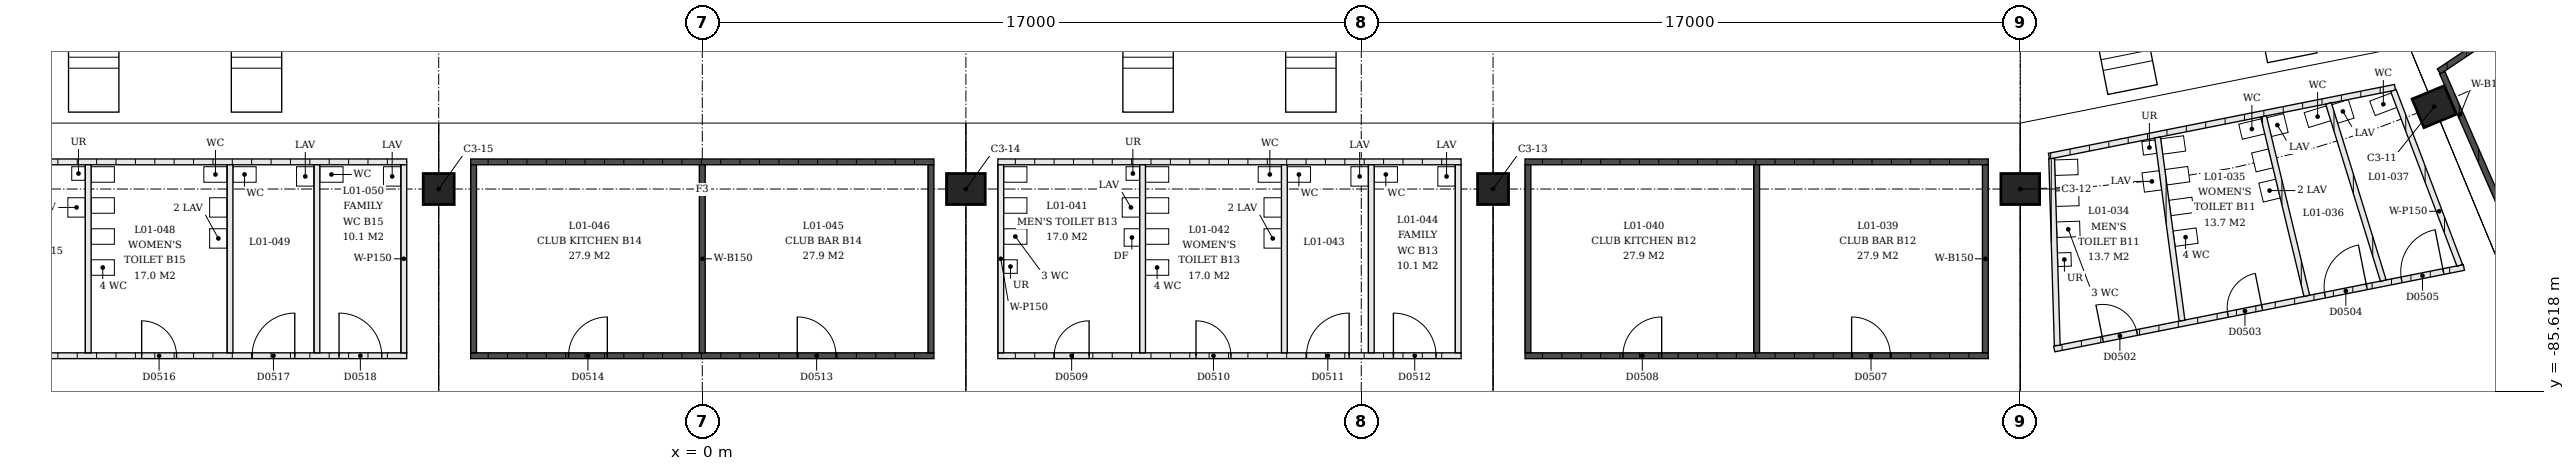
"""IFC4 building model, lengths in metres.
Left out: names, types, materials, properties, quantities, classifications, styles, units other than length and angle.
Written with IfcOpenShell. Run it as: python <this file> out.ifc"""

import sys

from ifc_helpers import new_model, si_unit, direction, frame, frame_2d, origin, origin_2d, place, context, subcontext, project, spatial, rectangle, extrude, element, fill, save


model = new_model("IFC4")
c1 = context("Model", 3, precision=1e-05, world=origin(), true_north=direction((0.0, 1.0)))
c2 = subcontext(c1, "Body", "Model", "MODEL_VIEW")
j1 = project(units=[si_unit("LENGTHUNIT", "METRE"), si_unit("PLANEANGLEUNIT", "RADIAN")], contexts=[c1])
p1 = place(None, origin())
s1 = spatial("IfcSite", under=j1, at=p1, CompositionType="ELEMENT")
p2 = place(p1, origin())
s2 = spatial("IfcBuilding", under=s1, at=p2, CompositionType="ELEMENT")
p3 = place(p2, frame((0.0, 0.0, 4.5)))
s3 = spatial("IfcBuildingStorey", under=s2, at=p3, CompositionType="ELEMENT", Elevation=4.5)
p4 = place(p3, frame((44.677, -78.276, 0.0), z_axis=(0.0, 0.0, 1.0), x_axis=(0.923879532511, 0.382683432365, 0.0)))
e1 = element("IfcColumn", 1, at=p4, inside=s3, PredefinedType="COLUMN", context=c2, shape_type="SweptSolid", body=[
    extrude(rectangle(XDim=0.9, YDim=0.8, at=origin_2d()), origin(), (0.0, 0.0, 1.0), 4.5),
])
p5 = place(p3, frame((34.0, -80.4, 0.0), z_axis=(0.0, 0.0, 1.0), x_axis=(1.0, 0.0, 0.0)))
e2 = element("IfcColumn", 2, at=p5, inside=s3, PredefinedType="COLUMN", context=c2, shape_type="SweptSolid", body=[
    extrude(rectangle(XDim=1.0, YDim=0.8, at=origin_2d()), origin(), (0.0, 0.0, 1.0), 4.5),
])
p6 = place(p3, frame((20.4, -80.4, 0.0), z_axis=(0.0, 0.0, 1.0), x_axis=(1.0, 0.0, 0.0)))
e3 = element("IfcColumn", 3, at=p6, inside=s3, PredefinedType="COLUMN", context=c2, shape_type="SweptSolid", body=[
    extrude(rectangle(XDim=0.8, YDim=0.8, at=origin_2d()), origin(), (0.0, 0.0, 1.0), 4.5),
])
p7 = place(p3, frame((6.8, -80.4, 0.0), z_axis=(0.0, 0.0, 1.0), x_axis=(1.0, 0.0, 0.0)))
e4 = element("IfcColumn", 4, at=p7, inside=s3, PredefinedType="COLUMN", context=c2, shape_type="SweptSolid", body=[
    extrude(rectangle(XDim=1.0, YDim=0.8, at=origin_2d()), origin(), (0.0, 0.0, 1.0), 4.5),
])
p8 = place(p3, frame((-6.8, -80.4, 0.0), z_axis=(0.0, 0.0, 1.0), x_axis=(1.0, 0.0, 0.0)))
e5 = element("IfcColumn", 5, at=p8, inside=s3, PredefinedType="COLUMN", context=c2, shape_type="SweptSolid", body=[
    extrude(rectangle(XDim=0.8, YDim=0.8, at=origin_2d()), origin(), (0.0, 0.0, 1.0), 4.5),
])
p9 = place(p3, frame((52.605, -72.153, 0.0), z_axis=(0.0, 0.0, 1.0), x_axis=(-0.831461674059, -0.555582113257, 0.0)))
e6 = element("IfcWall", 6, at=p9, inside=s3, PredefinedType="SOLIDWALL", context=c2, shape_type="SweptSolid", body=[
    extrude(rectangle(XDim=9.388, YDim=0.15, at=frame_2d((4.694, 0.0))), origin(), (0.0, 0.0, 1.0), 3.0),
])
p10 = place(p3, frame((44.886, -77.399, 0.0), z_axis=(0.0, 0.0, 1.0), x_axis=(0.400646552146, -0.916232688924, 0.0)))
e7 = element("IfcWall", 7, at=p10, inside=s3, PredefinedType="SOLIDWALL", context=c2, shape_type="SweptSolid", body=[
    extrude(rectangle(XDim=4.832, YDim=0.15, at=frame_2d((2.416, 0.0))), origin(), (0.0, 0.0, 1.0), 3.0),
])
p11 = place(p3, frame((34.741, -79.552, 0.0), z_axis=(0.0, 0.0, 1.0), x_axis=(0.980786464492, 0.195084369103, 0.0)))
e8 = element("IfcWall", 8, at=p11, inside=s3, PredefinedType="PARTITIONING", context=c2, shape_type="SweptSolid", body=[
    extrude(rectangle(XDim=9.102, YDim=0.15, at=frame_2d((4.551, 0.0))), origin(), (0.0, 0.0, 1.0), 3.0),
])
p12 = place(p3, frame((34.877, -84.525, 0.0), z_axis=(0.0, 0.0, 1.0), x_axis=(0.98078580384, 0.195087690502, 0.0)))
e9 = element("IfcWall", 9, at=p12, inside=s3, PredefinedType="PARTITIONING", context=c2, shape_type="SweptSolid", body=[
    extrude(rectangle(XDim=10.775, YDim=0.15, at=frame_2d((5.387, 0.0))), origin(), (0.0, 0.0, 1.0), 3.0),
])
p13 = place(p12, frame((1.276, 0.0, 0.0)))
e10 = element("IfcOpeningElement", 10, at=p13, cuts=e9, PredefinedType="OPENING", context=c2, shape_type="SweptSolid", body=[
    extrude(rectangle(XDim=0.9, YDim=2.1, at=frame_2d((0.45, 1.05))), frame((0.0, 0.075, 0.0), z_axis=(0.0, -1.0, 0.0), x_axis=(1.0, 0.0, 0.0)), (0.0, 0.0, 1.0), 0.15),
])
p14 = place(p12, frame((4.566, 0.0, 0.0)))
e11 = element("IfcOpeningElement", 11, at=p14, cuts=e9, PredefinedType="OPENING", context=c2, shape_type="SweptSolid", body=[
    extrude(rectangle(XDim=0.9, YDim=2.1, at=frame_2d((0.45, 1.05))), frame((0.0, 0.075, 0.0), z_axis=(0.0, -1.0, 0.0), x_axis=(1.0, 0.0, 0.0)), (0.0, 0.0, 1.0), 0.15),
])
p15 = place(p12, frame((7.119, 0.0, 0.0)))
e12 = element("IfcOpeningElement", 12, at=p15, cuts=e9, PredefinedType="OPENING", context=c2, shape_type="SweptSolid", body=[
    extrude(rectangle(XDim=1.1, YDim=2.1, at=frame_2d((0.55, 1.05))), frame((0.0, 0.075, 0.0), z_axis=(0.0, -1.0, 0.0), x_axis=(1.0, 0.0, 0.0)), (0.0, 0.0, 1.0), 0.15),
])
p16 = place(p12, frame((9.135, 0.0, 0.0)))
e13 = element("IfcOpeningElement", 13, at=p16, cuts=e9, PredefinedType="OPENING", context=c2, shape_type="SweptSolid", body=[
    extrude(rectangle(XDim=1.1, YDim=2.1, at=frame_2d((0.55, 1.05))), frame((0.0, 0.075, 0.0), z_axis=(0.0, -1.0, 0.0), x_axis=(1.0, 0.0, 0.0)), (0.0, 0.0, 1.0), 0.15),
])
p17 = place(p3, frame((34.811, -79.614, 0.0), z_axis=(0.0, 0.0, 1.0), x_axis=(0.02991368842, -0.999552485488, 0.0)))
e14 = element("IfcWall", 14, at=p17, inside=s3, PredefinedType="PARTITIONING", context=c2, shape_type="SweptSolid", body=[
    extrude(rectangle(XDim=4.823, YDim=0.15, at=frame_2d((2.412, 0.0))), origin(), (0.0, 0.0, 1.0), 3.0),
])
p18 = place(p3, frame((37.544, -79.07, 0.0), z_axis=(0.0, 0.0, 1.0), x_axis=(0.132200625744, -0.99122297923, 0.0)))
e15 = element("IfcWall", 15, at=p18, inside=s3, PredefinedType="PARTITIONING", context=c2, shape_type="SweptSolid", body=[
    extrude(rectangle(XDim=4.766, YDim=0.15, at=frame_2d((2.383, 0.0))), origin(), (0.0, 0.0, 1.0), 3.0),
])
p19 = place(p3, frame((40.277, -78.526, 0.0), z_axis=(0.0, 0.0, 1.0), x_axis=(0.234455054274, -0.9721269606, 0.0)))
e16 = element("IfcWall", 16, at=p19, inside=s3, PredefinedType="PARTITIONING", context=c2, shape_type="SweptSolid", body=[
    extrude(rectangle(XDim=4.761, YDim=0.15, at=frame_2d((2.38, 0.0))), origin(), (0.0, 0.0, 1.0), 3.0),
])
p20 = place(p3, frame((41.952, -78.193, 0.0), z_axis=(0.0, 0.0, 1.0), x_axis=(0.295678182088, -0.955287607288, 0.0)))
e17 = element("IfcWall", 17, at=p20, inside=s3, PredefinedType="PARTITIONING", context=c2, shape_type="SweptSolid", body=[
    extrude(rectangle(XDim=4.782, YDim=0.15, at=frame_2d((2.391, 0.0))), origin(), (0.0, 0.0, 1.0), 3.0),
])
p21 = place(p3, frame((43.627, -77.86, 0.0), z_axis=(0.0, 0.0, 1.0), x_axis=(0.354909029819, -0.934900839957, 0.0)))
e18 = element("IfcWall", 18, at=p21, inside=s3, PredefinedType="PARTITIONING", context=c2, shape_type="SweptSolid", body=[
    extrude(rectangle(XDim=4.823, YDim=0.15, at=frame_2d((2.412, 0.0))), origin(), (0.0, 0.0, 1.0), 3.0),
])
p22 = place(p3, frame((33.175, -79.7, 0.0), z_axis=(0.0, 0.0, 1.0), x_axis=(-1.0, 0.0, 0.0)))
e19 = element("IfcWall", 19, at=p22, inside=s3, PredefinedType="SOLIDWALL", context=c2, shape_type="SweptSolid", body=[
    extrude(rectangle(XDim=11.95, YDim=0.15, at=frame_2d((5.975, 0.0))), origin(), (0.0, 0.0, 1.0), 3.0),
])
p23 = place(p3, frame((33.175, -84.7, 0.0), z_axis=(0.0, 0.0, 1.0), x_axis=(-1.0, 0.0, 0.0)))
e20 = element("IfcWall", 20, at=p23, inside=s3, PredefinedType="SOLIDWALL", context=c2, shape_type="SweptSolid", body=[
    extrude(rectangle(XDim=11.95, YDim=0.15, at=frame_2d((5.975, 0.0))), origin(), (0.0, 0.0, 1.0), 3.0),
])
p24 = place(p23, frame((2.525, 0.0, 0.0)))
e21 = element("IfcOpeningElement", 21, at=p24, cuts=e20, PredefinedType="OPENING", context=c2, shape_type="SweptSolid", body=[
    extrude(rectangle(XDim=1.0, YDim=2.1, at=frame_2d((0.5, 1.05))), frame((0.0, 0.075, 0.0), z_axis=(0.0, -1.0, 0.0), x_axis=(1.0, 0.0, 0.0)), (0.0, 0.0, 1.0), 0.15),
])
p25 = place(p23, frame((8.425, 0.0, 0.0)))
e22 = element("IfcOpeningElement", 22, at=p25, cuts=e20, PredefinedType="OPENING", context=c2, shape_type="SweptSolid", body=[
    extrude(rectangle(XDim=1.0, YDim=2.1, at=frame_2d((0.5, 1.05))), frame((0.0, 0.075, 0.0), z_axis=(0.0, -1.0, 0.0), x_axis=(1.0, 0.0, 0.0)), (0.0, 0.0, 1.0), 0.15),
])
for number, where, z_axis, x_axis in (
    (23, (33.1, -79.775, 0.0), (0.0, 0.0, 1.0), (0.0, -1.0, 0.0)),
    (24, (27.2, -79.775, 0.0), (0.0, 0.0, 1.0), (0.0, -1.0, 0.0)),
    (25, (21.3, -79.775, 0.0), (0.0, 0.0, 1.0), (0.0, -1.0, 0.0)),
):
    element("IfcWall", number, at=place(p3, frame(where, z_axis=z_axis, x_axis=x_axis)), inside=s3, PredefinedType="SOLIDWALL", context=c2, shape_type="SweptSolid", body=[
        extrude(rectangle(XDim=4.85, YDim=0.15, at=frame_2d((2.425, 0.0))), origin(), (0.0, 0.0, 1.0), 3.0),
    ])
p26 = place(p3, frame((7.625, -79.7, 0.0), z_axis=(0.0, 0.0, 1.0), x_axis=(1.0, 0.0, 0.0)))
e26 = element("IfcWall", 26, at=p26, inside=s3, PredefinedType="PARTITIONING", context=c2, shape_type="SweptSolid", body=[
    extrude(rectangle(XDim=11.95, YDim=0.15, at=frame_2d((5.975, 0.0))), origin(), (0.0, 0.0, 1.0), 3.0),
])
p27 = place(p3, frame((7.625, -84.7, 0.0), z_axis=(0.0, 0.0, 1.0), x_axis=(1.0, 0.0, 0.0)))
e27 = element("IfcWall", 27, at=p27, inside=s3, PredefinedType="PARTITIONING", context=c2, shape_type="SweptSolid", body=[
    extrude(rectangle(XDim=11.95, YDim=0.15, at=frame_2d((5.975, 0.0))), origin(), (0.0, 0.0, 1.0), 3.0),
])
p28 = place(p27, frame((1.454, 0.0, 0.0)))
e28 = element("IfcOpeningElement", 28, at=p28, cuts=e27, PredefinedType="OPENING", context=c2, shape_type="SweptSolid", body=[
    extrude(rectangle(XDim=0.9, YDim=2.1, at=frame_2d((0.45, 1.05))), frame((0.0, 0.075, 0.0), z_axis=(0.0, -1.0, 0.0), x_axis=(1.0, 0.0, 0.0)), (0.0, 0.0, 1.0), 0.15),
])
p29 = place(p27, frame((5.112, 0.0, 0.0)))
e29 = element("IfcOpeningElement", 29, at=p29, cuts=e27, PredefinedType="OPENING", context=c2, shape_type="SweptSolid", body=[
    extrude(rectangle(XDim=0.9, YDim=2.1, at=frame_2d((0.45, 1.05))), frame((0.0, 0.075, 0.0), z_axis=(0.0, -1.0, 0.0), x_axis=(1.0, 0.0, 0.0)), (0.0, 0.0, 1.0), 0.15),
])
p30 = place(p27, frame((7.962, 0.0, 0.0)))
e30 = element("IfcOpeningElement", 30, at=p30, cuts=e27, PredefinedType="OPENING", context=c2, shape_type="SweptSolid", body=[
    extrude(rectangle(XDim=1.1, YDim=2.1, at=frame_2d((0.55, 1.05))), frame((0.0, 0.075, 0.0), z_axis=(0.0, -1.0, 0.0), x_axis=(1.0, 0.0, 0.0)), (0.0, 0.0, 1.0), 0.15),
])
p31 = place(p27, frame((10.204, 0.0, 0.0)))
e31 = element("IfcOpeningElement", 31, at=p31, cuts=e27, PredefinedType="OPENING", context=c2, shape_type="SweptSolid", body=[
    extrude(rectangle(XDim=1.1, YDim=2.1, at=frame_2d((0.55, 1.05))), frame((0.0, 0.075, 0.0), z_axis=(0.0, -1.0, 0.0), x_axis=(1.0, 0.0, 0.0)), (0.0, 0.0, 1.0), 0.15),
])
for number, where, z_axis, x_axis in (
    (32, (7.7, -79.775, 0.0), (0.0, 0.0, 1.0), (0.0, -1.0, 0.0)),
    (33, (11.358, -79.775, 0.0), (0.0, 0.0, 1.0), (0.0, -1.0, 0.0)),
    (34, (15.016, -79.775, 0.0), (0.0, 0.0, 1.0), (0.0, -1.0, 0.0)),
    (35, (17.258, -79.775, 0.0), (0.0, 0.0, 1.0), (0.0, -1.0, 0.0)),
    (36, (19.5, -79.775, 0.0), (0.0, 0.0, 1.0), (0.0, -1.0, 0.0)),
):
    element("IfcWall", number, at=place(p3, frame(where, z_axis=z_axis, x_axis=x_axis)), inside=s3, PredefinedType="PARTITIONING", context=c2, shape_type="SweptSolid", body=[
        extrude(rectangle(XDim=4.85, YDim=0.15, at=frame_2d((2.425, 0.0))), origin(), (0.0, 0.0, 1.0), 3.0),
    ])
p32 = place(p3, frame((5.975, -79.7, 0.0), z_axis=(0.0, 0.0, 1.0), x_axis=(-1.0, 0.0, 0.0)))
e37 = element("IfcWall", 37, at=p32, inside=s3, PredefinedType="SOLIDWALL", context=c2, shape_type="SweptSolid", body=[
    extrude(rectangle(XDim=11.95, YDim=0.15, at=frame_2d((5.975, 0.0))), origin(), (0.0, 0.0, 1.0), 3.0),
])
p33 = place(p3, frame((5.975, -84.7, 0.0), z_axis=(0.0, 0.0, 1.0), x_axis=(-1.0, 0.0, 0.0)))
e38 = element("IfcWall", 38, at=p33, inside=s3, PredefinedType="SOLIDWALL", context=c2, shape_type="SweptSolid", body=[
    extrude(rectangle(XDim=11.95, YDim=0.15, at=frame_2d((5.975, 0.0))), origin(), (0.0, 0.0, 1.0), 3.0),
])
p34 = place(p33, frame((2.525, 0.0, 0.0)))
e39 = element("IfcOpeningElement", 39, at=p34, cuts=e38, PredefinedType="OPENING", context=c2, shape_type="SweptSolid", body=[
    extrude(rectangle(XDim=1.0, YDim=2.1, at=frame_2d((0.5, 1.05))), frame((0.0, 0.075, 0.0), z_axis=(0.0, -1.0, 0.0), x_axis=(1.0, 0.0, 0.0)), (0.0, 0.0, 1.0), 0.15),
])
p35 = place(p33, frame((8.425, 0.0, 0.0)))
e40 = element("IfcOpeningElement", 40, at=p35, cuts=e38, PredefinedType="OPENING", context=c2, shape_type="SweptSolid", body=[
    extrude(rectangle(XDim=1.0, YDim=2.1, at=frame_2d((0.5, 1.05))), frame((0.0, 0.075, 0.0), z_axis=(0.0, -1.0, 0.0), x_axis=(1.0, 0.0, 0.0)), (0.0, 0.0, 1.0), 0.15),
])
for number, where, z_axis, x_axis in (
    (41, (5.9, -79.775, 0.0), (0.0, 0.0, 1.0), (0.0, -1.0, 0.0)),
    (42, (0.0, -79.775, 0.0), (0.0, 0.0, 1.0), (0.0, -1.0, 0.0)),
    (43, (-5.9, -79.775, 0.0), (0.0, 0.0, 1.0), (0.0, -1.0, 0.0)),
):
    element("IfcWall", number, at=place(p3, frame(where, z_axis=z_axis, x_axis=x_axis)), inside=s3, PredefinedType="SOLIDWALL", context=c2, shape_type="SweptSolid", body=[
        extrude(rectangle(XDim=4.85, YDim=0.15, at=frame_2d((2.425, 0.0))), origin(), (0.0, 0.0, 1.0), 3.0),
    ])
p36 = place(p3, frame((-19.575, -79.7, 0.0), z_axis=(0.0, 0.0, 1.0), x_axis=(1.0, 0.0, 0.0)))
e44 = element("IfcWall", 44, at=p36, inside=s3, PredefinedType="PARTITIONING", context=c2, shape_type="SweptSolid", body=[
    extrude(rectangle(XDim=11.95, YDim=0.15, at=frame_2d((5.975, 0.0))), origin(), (0.0, 0.0, 1.0), 3.0),
])
p37 = place(p3, frame((-19.575, -84.7, 0.0), z_axis=(0.0, 0.0, 1.0), x_axis=(1.0, 0.0, 0.0)))
e45 = element("IfcWall", 45, at=p37, inside=s3, PredefinedType="PARTITIONING", context=c2, shape_type="SweptSolid", body=[
    extrude(rectangle(XDim=11.95, YDim=0.15, at=frame_2d((5.975, 0.0))), origin(), (0.0, 0.0, 1.0), 3.0),
])
p38 = place(p37, frame((1.454, 0.0, 0.0)))
e46 = element("IfcOpeningElement", 46, at=p38, cuts=e45, PredefinedType="OPENING", context=c2, shape_type="SweptSolid", body=[
    extrude(rectangle(XDim=0.9, YDim=2.1, at=frame_2d((0.45, 1.05))), frame((0.0, 0.075, 0.0), z_axis=(0.0, -1.0, 0.0), x_axis=(1.0, 0.0, 0.0)), (0.0, 0.0, 1.0), 0.15),
])
p39 = place(p37, frame((5.112, 0.0, 0.0)))
e47 = element("IfcOpeningElement", 47, at=p39, cuts=e45, PredefinedType="OPENING", context=c2, shape_type="SweptSolid", body=[
    extrude(rectangle(XDim=0.9, YDim=2.1, at=frame_2d((0.45, 1.05))), frame((0.0, 0.075, 0.0), z_axis=(0.0, -1.0, 0.0), x_axis=(1.0, 0.0, 0.0)), (0.0, 0.0, 1.0), 0.15),
])
p40 = place(p37, frame((7.962, 0.0, 0.0)))
e48 = element("IfcOpeningElement", 48, at=p40, cuts=e45, PredefinedType="OPENING", context=c2, shape_type="SweptSolid", body=[
    extrude(rectangle(XDim=1.1, YDim=2.1, at=frame_2d((0.55, 1.05))), frame((0.0, 0.075, 0.0), z_axis=(0.0, -1.0, 0.0), x_axis=(1.0, 0.0, 0.0)), (0.0, 0.0, 1.0), 0.15),
])
p41 = place(p37, frame((10.204, 0.0, 0.0)))
e49 = element("IfcOpeningElement", 49, at=p41, cuts=e45, PredefinedType="OPENING", context=c2, shape_type="SweptSolid", body=[
    extrude(rectangle(XDim=1.1, YDim=2.1, at=frame_2d((0.55, 1.05))), frame((0.0, 0.075, 0.0), z_axis=(0.0, -1.0, 0.0), x_axis=(1.0, 0.0, 0.0)), (0.0, 0.0, 1.0), 0.15),
])
for number, where, z_axis, x_axis in (
    (50, (-15.842, -79.775, 0.0), (0.0, 0.0, 1.0), (0.0, -1.0, 0.0)),
    (51, (-12.184, -79.775, 0.0), (0.0, 0.0, 1.0), (0.0, -1.0, 0.0)),
    (52, (-9.942, -79.775, 0.0), (0.0, 0.0, 1.0), (0.0, -1.0, 0.0)),
    (53, (-7.7, -79.775, 0.0), (0.0, 0.0, 1.0), (0.0, -1.0, 0.0)),
):
    element("IfcWall", number, at=place(p3, frame(where, z_axis=z_axis, x_axis=x_axis)), inside=s3, PredefinedType="PARTITIONING", context=c2, shape_type="SweptSolid", body=[
        extrude(rectangle(XDim=4.85, YDim=0.15, at=frame_2d((2.425, 0.0))), origin(), (0.0, 0.0, 1.0), 3.0),
    ])
p42 = place(p13, origin())
e54 = element("IfcDoor", 54, at=p42, inside=s3, OperationType="SINGLE_SWING_RIGHT", PredefinedType="DOOR", context=c2, shape_type="SweptSolid", body=[
    extrude(rectangle(XDim=0.9, YDim=2.1, at=frame_2d((0.45, 1.05))), frame((0.0, 0.025, 0.0), z_axis=(0.0, -1.0, 0.0), x_axis=(1.0, 0.0, 0.0)), (0.0, 0.0, 1.0), 0.05),
])
fill(e10, e54)
p43 = place(p14, origin())
e55 = element("IfcDoor", 55, at=p43, inside=s3, OperationType="SINGLE_SWING_LEFT", PredefinedType="DOOR", context=c2, shape_type="SweptSolid", body=[
    extrude(rectangle(XDim=0.9, YDim=2.1, at=frame_2d((0.45, 1.05))), frame((0.0, 0.025, 0.0), z_axis=(0.0, -1.0, 0.0), x_axis=(1.0, 0.0, 0.0)), (0.0, 0.0, 1.0), 0.05),
])
fill(e11, e55)
p44 = place(p15, origin())
e56 = element("IfcDoor", 56, at=p44, inside=s3, OperationType="SINGLE_SWING_LEFT", PredefinedType="DOOR", context=c2, shape_type="SweptSolid", body=[
    extrude(rectangle(XDim=1.1, YDim=2.1, at=frame_2d((0.55, 1.05))), frame((0.0, 0.025, 0.0), z_axis=(0.0, -1.0, 0.0), x_axis=(1.0, 0.0, 0.0)), (0.0, 0.0, 1.0), 0.05),
])
fill(e12, e56)
p45 = place(p16, origin())
e57 = element("IfcDoor", 57, at=p45, inside=s3, OperationType="SINGLE_SWING_LEFT", PredefinedType="DOOR", context=c2, shape_type="SweptSolid", body=[
    extrude(rectangle(XDim=1.1, YDim=2.1, at=frame_2d((0.55, 1.05))), frame((0.0, 0.025, 0.0), z_axis=(0.0, -1.0, 0.0), x_axis=(1.0, 0.0, 0.0)), (0.0, 0.0, 1.0), 0.05),
])
fill(e13, e57)
p46 = place(p24, origin())
e58 = element("IfcDoor", 58, at=p46, inside=s3, OperationType="SINGLE_SWING_RIGHT", PredefinedType="DOOR", context=c2, shape_type="SweptSolid", body=[
    extrude(rectangle(XDim=1.0, YDim=2.1, at=frame_2d((0.5, 1.05))), frame((0.0, 0.025, 0.0), z_axis=(0.0, -1.0, 0.0), x_axis=(1.0, 0.0, 0.0)), (0.0, 0.0, 1.0), 0.05),
])
fill(e21, e58)
p47 = place(p25, origin())
e59 = element("IfcDoor", 59, at=p47, inside=s3, OperationType="SINGLE_SWING_LEFT", PredefinedType="DOOR", context=c2, shape_type="SweptSolid", body=[
    extrude(rectangle(XDim=1.0, YDim=2.1, at=frame_2d((0.5, 1.05))), frame((0.0, 0.025, 0.0), z_axis=(0.0, -1.0, 0.0), x_axis=(1.0, 0.0, 0.0)), (0.0, 0.0, 1.0), 0.05),
])
fill(e22, e59)
p48 = place(p28, origin())
e60 = element("IfcDoor", 60, at=p48, inside=s3, OperationType="SINGLE_SWING_LEFT", PredefinedType="DOOR", context=c2, shape_type="SweptSolid", body=[
    extrude(rectangle(XDim=0.9, YDim=2.1, at=frame_2d((0.45, 1.05))), frame((0.0, 0.025, 0.0), z_axis=(0.0, -1.0, 0.0), x_axis=(1.0, 0.0, 0.0)), (0.0, 0.0, 1.0), 0.05),
])
fill(e28, e60)
p49 = place(p29, origin())
e61 = element("IfcDoor", 61, at=p49, inside=s3, OperationType="SINGLE_SWING_RIGHT", PredefinedType="DOOR", context=c2, shape_type="SweptSolid", body=[
    extrude(rectangle(XDim=0.9, YDim=2.1, at=frame_2d((0.45, 1.05))), frame((0.0, 0.025, 0.0), z_axis=(0.0, -1.0, 0.0), x_axis=(1.0, 0.0, 0.0)), (0.0, 0.0, 1.0), 0.05),
])
fill(e29, e61)
p50 = place(p30, origin())
e62 = element("IfcDoor", 62, at=p50, inside=s3, OperationType="SINGLE_SWING_LEFT", PredefinedType="DOOR", context=c2, shape_type="SweptSolid", body=[
    extrude(rectangle(XDim=1.1, YDim=2.1, at=frame_2d((0.55, 1.05))), frame((0.0, 0.025, 0.0), z_axis=(0.0, -1.0, 0.0), x_axis=(1.0, 0.0, 0.0)), (0.0, 0.0, 1.0), 0.05),
])
fill(e30, e62)
p51 = place(p31, origin())
e63 = element("IfcDoor", 63, at=p51, inside=s3, OperationType="SINGLE_SWING_RIGHT", PredefinedType="DOOR", context=c2, shape_type="SweptSolid", body=[
    extrude(rectangle(XDim=1.1, YDim=2.1, at=frame_2d((0.55, 1.05))), frame((0.0, 0.025, 0.0), z_axis=(0.0, -1.0, 0.0), x_axis=(1.0, 0.0, 0.0)), (0.0, 0.0, 1.0), 0.05),
])
fill(e31, e63)
p52 = place(p34, origin())
e64 = element("IfcDoor", 64, at=p52, inside=s3, OperationType="SINGLE_SWING_RIGHT", PredefinedType="DOOR", context=c2, shape_type="SweptSolid", body=[
    extrude(rectangle(XDim=1.0, YDim=2.1, at=frame_2d((0.5, 1.05))), frame((0.0, 0.025, 0.0), z_axis=(0.0, -1.0, 0.0), x_axis=(1.0, 0.0, 0.0)), (0.0, 0.0, 1.0), 0.05),
])
fill(e39, e64)
p53 = place(p35, origin())
e65 = element("IfcDoor", 65, at=p53, inside=s3, OperationType="SINGLE_SWING_LEFT", PredefinedType="DOOR", context=c2, shape_type="SweptSolid", body=[
    extrude(rectangle(XDim=1.0, YDim=2.1, at=frame_2d((0.5, 1.05))), frame((0.0, 0.025, 0.0), z_axis=(0.0, -1.0, 0.0), x_axis=(1.0, 0.0, 0.0)), (0.0, 0.0, 1.0), 0.05),
])
fill(e40, e65)
p54 = place(p39, origin())
e66 = element("IfcDoor", 66, at=p54, inside=s3, OperationType="SINGLE_SWING_RIGHT", PredefinedType="DOOR", context=c2, shape_type="SweptSolid", body=[
    extrude(rectangle(XDim=0.9, YDim=2.1, at=frame_2d((0.45, 1.05))), frame((0.0, 0.025, 0.0), z_axis=(0.0, -1.0, 0.0), x_axis=(1.0, 0.0, 0.0)), (0.0, 0.0, 1.0), 0.05),
])
fill(e47, e66)
p55 = place(p40, origin())
e67 = element("IfcDoor", 67, at=p55, inside=s3, OperationType="SINGLE_SWING_LEFT", PredefinedType="DOOR", context=c2, shape_type="SweptSolid", body=[
    extrude(rectangle(XDim=1.1, YDim=2.1, at=frame_2d((0.55, 1.05))), frame((0.0, 0.025, 0.0), z_axis=(0.0, -1.0, 0.0), x_axis=(1.0, 0.0, 0.0)), (0.0, 0.0, 1.0), 0.05),
])
fill(e48, e67)
p56 = place(p41, origin())
e68 = element("IfcDoor", 68, at=p56, inside=s3, OperationType="SINGLE_SWING_RIGHT", PredefinedType="DOOR", context=c2, shape_type="SweptSolid", body=[
    extrude(rectangle(XDim=1.1, YDim=2.1, at=frame_2d((0.55, 1.05))), frame((0.0, 0.025, 0.0), z_axis=(0.0, -1.0, 0.0), x_axis=(1.0, 0.0, 0.0)), (0.0, 0.0, 1.0), 0.05),
])
fill(e49, e68)
save(model, sys.argv[1])
